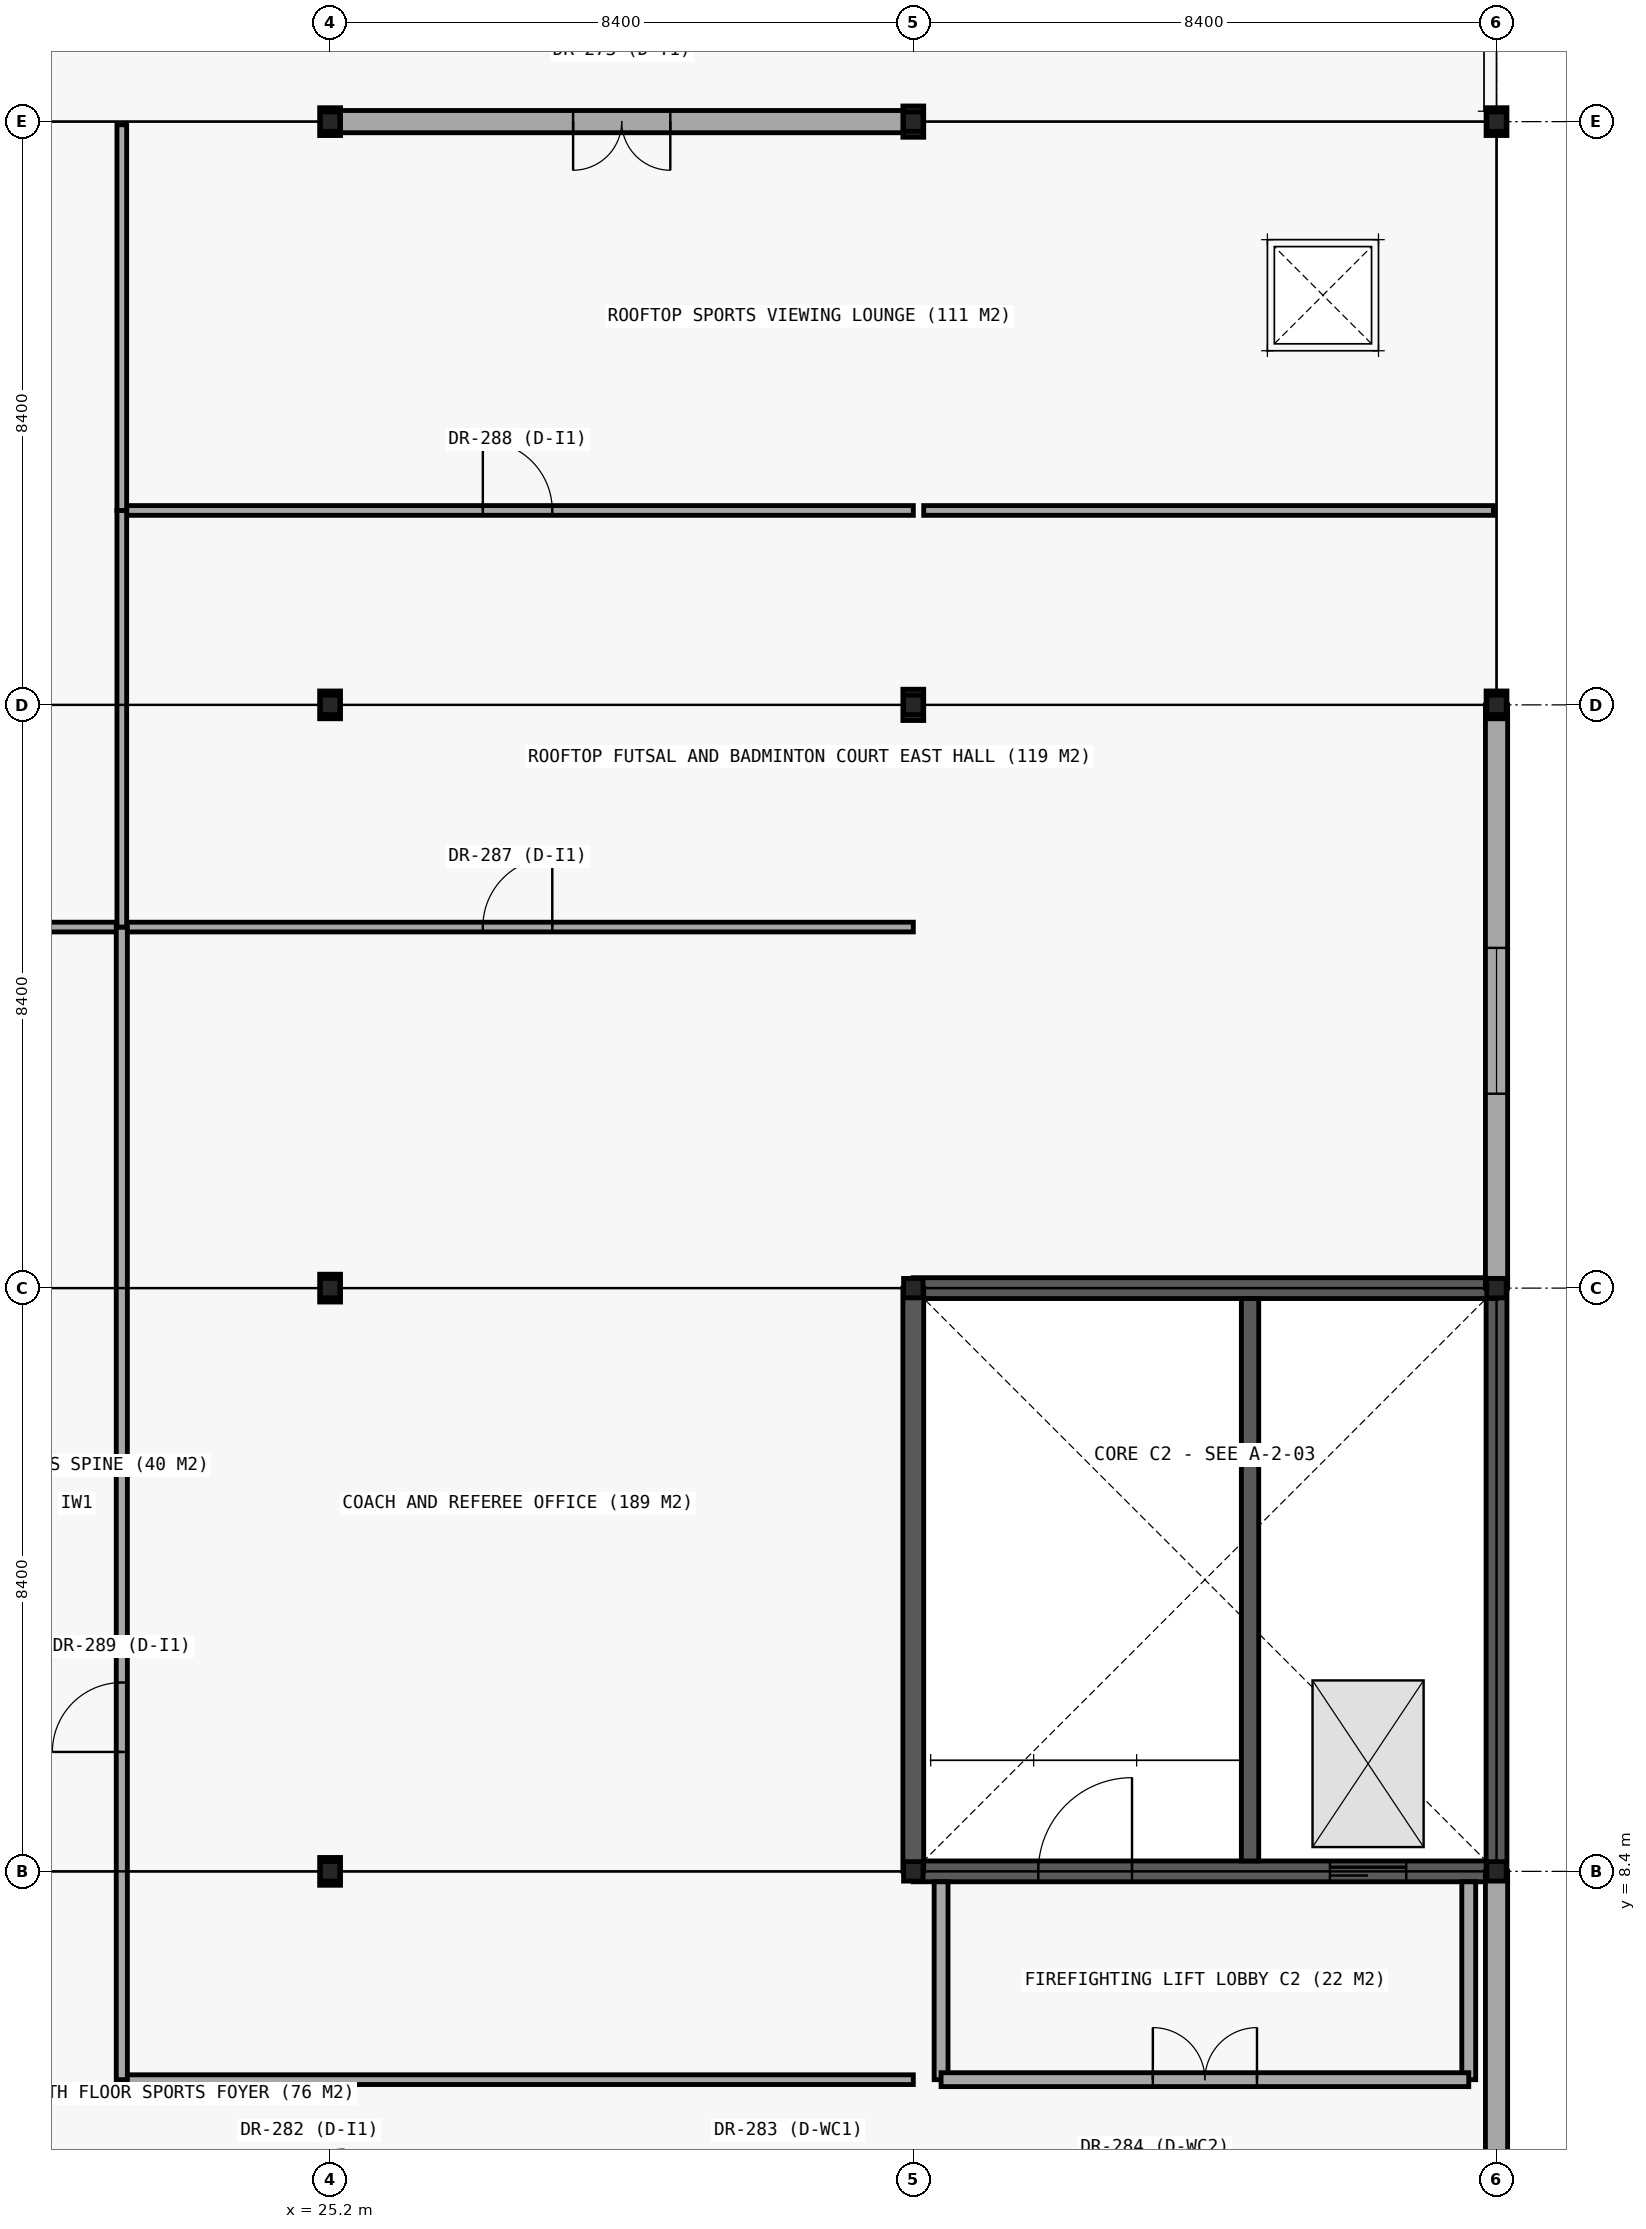
"""IFC4 building model, lengths in metres.
Left out: names, types, materials, properties, quantities, classifications, styles, units other than length and angle.
Written with IfcOpenShell. Run it as: python <this file> out.ifc"""

import sys

from ifc_helpers import new_model, si_unit, direction, frame, frame_2d, origin, origin_2d, place, context, subcontext, project, spatial, rectangle, i_section, extrude, element, fill, save


model = new_model("IFC4")
c1 = context("Model", 3, precision=1e-05, world=origin(), true_north=direction((0.0, 1.0)))
c2 = subcontext(c1, "Body", "Model", "MODEL_VIEW")
j1 = project(units=[si_unit("LENGTHUNIT", "METRE"), si_unit("PLANEANGLEUNIT", "RADIAN")], contexts=[c1])
p1 = place(None, origin())
s1 = spatial("IfcSite", under=j1, at=p1, CompositionType="ELEMENT")
p2 = place(p1, origin())
s2 = spatial("IfcBuilding", under=s1, at=p2, CompositionType="ELEMENT")
p3 = place(p2, frame((0.0, 0.0, 26.4)))
s3 = spatial("IfcBuildingStorey", under=s2, at=p3, CompositionType="ELEMENT", Elevation=26.4)
p4 = place(p3, frame((33.6, 8.4, 0.0), z_axis=(0.0, 0.0, 1.0), x_axis=(1.0, 0.0, 0.0)))
e1 = element("IfcWall", 1, at=p4, inside=s3, PredefinedType="SHEAR", context=c2, shape_type="SweptSolid", body=[
    extrude(rectangle(XDim=8.4, YDim=0.3, at=frame_2d((4.2, 0.0))), origin(), (0.0, 0.0, 1.0), 4.8),
])
p5 = place(p4, frame((1.8, 0.0, 0.0)))
e2 = element("IfcOpeningElement", 2, at=p5, cuts=e1, PredefinedType="OPENING", context=c2, shape_type="SweptSolid", body=[
    extrude(rectangle(XDim=1.35, YDim=2.2, at=frame_2d((0.675, 1.1))), frame((0.0, 0.16, 0.0), z_axis=(0.0, -1.0, 0.0), x_axis=(1.0, 0.0, 0.0)), (0.0, 0.0, 1.0), 0.32),
])
p6 = place(p4, frame((6.0, 0.0, 0.0)))
e3 = element("IfcOpeningElement", 3, at=p6, cuts=e1, PredefinedType="OPENING", context=c2, shape_type="SweptSolid", body=[
    extrude(rectangle(XDim=1.1, YDim=2.2, at=frame_2d((0.55, 1.1))), frame((0.0, 0.16, 0.0), z_axis=(0.0, -1.0, 0.0), x_axis=(1.0, 0.0, 0.0)), (0.0, 0.0, 1.0), 0.32),
])
p7 = place(p3, frame((42.0, 8.4, 0.0), z_axis=(0.0, 0.0, 1.0), x_axis=(0.0, 1.0, 0.0)))
e4 = element("IfcWall", 4, at=p7, inside=s3, PredefinedType="SHEAR", context=c2, shape_type="SweptSolid", body=[
    extrude(rectangle(XDim=8.4, YDim=0.3, at=frame_2d((4.2, 0.0))), origin(), (0.0, 0.0, 1.0), 4.8),
])
p8 = place(p3, frame((42.0, 16.8, 0.0), z_axis=(0.0, 0.0, 1.0), x_axis=(-1.0, 0.0, 0.0)))
e5 = element("IfcWall", 5, at=p8, inside=s3, PredefinedType="SHEAR", context=c2, shape_type="SweptSolid", body=[
    extrude(rectangle(XDim=8.4, YDim=0.3, at=frame_2d((4.2, 0.0))), origin(), (0.0, 0.0, 1.0), 4.8),
])
p9 = place(p3, frame((33.6, 16.8, 0.0), z_axis=(0.0, 0.0, 1.0), x_axis=(0.0, -1.0, 0.0)))
e6 = element("IfcWall", 6, at=p9, inside=s3, PredefinedType="SHEAR", context=c2, shape_type="SweptSolid", body=[
    extrude(rectangle(XDim=8.4, YDim=0.3, at=frame_2d((4.2, 0.0))), origin(), (0.0, 0.0, 1.0), 4.8),
])
p10 = place(p3, frame((38.45, 8.55, 0.0), z_axis=(0.0, 0.0, 1.0), x_axis=(0.0, 1.0, 0.0)))
e7 = element("IfcWall", 7, at=p10, inside=s3, PredefinedType="SHEAR", context=c2, shape_type="SweptSolid", body=[
    extrude(rectangle(XDim=8.1, YDim=0.25, at=frame_2d((4.05, 0.0))), origin(), (0.0, 0.0, 1.0), 4.8),
])
for number, where, z_axis, x_axis in (
    (8, (25.2, 8.4, 0.0), (0.0, 0.0, 1.0), (1.0, 0.0, 0.0)),
    (9, (25.2, 16.8, 0.0), (0.0, 0.0, 1.0), (1.0, 0.0, 0.0)),
    (10, (25.2, 25.2, 0.0), (0.0, 0.0, 1.0), (1.0, 0.0, 0.0)),
    (11, (25.2, 33.6, 0.0), (0.0, 0.0, 1.0), (1.0, 0.0, 0.0)),
):
    element("IfcColumn", number, at=place(p3, frame(where, z_axis=z_axis, x_axis=x_axis)), inside=s3, PredefinedType="COLUMN", context=c2, shape_type="SweptSolid", body=[
        extrude(i_section(OverallWidth=0.3, OverallDepth=0.4, WebThickness=0.013, FlangeThickness=0.024, FilletRadius=0.027, at=origin_2d()), origin(), (0.0, 0.0, 1.0), 4.63),
    ])
for number, where, z_axis, x_axis in (
    (12, (33.6, 25.2, 0.0), (0.0, 0.0, 1.0), (1.0, 0.0, 0.0)),
    (13, (33.6, 33.6, 0.0), (0.0, 0.0, 1.0), (1.0, 0.0, 0.0)),
):
    element("IfcColumn", number, at=place(p3, frame(where, z_axis=z_axis, x_axis=x_axis)), inside=s3, PredefinedType="COLUMN", context=c2, shape_type="SweptSolid", body=[
        extrude(i_section(OverallWidth=0.3, OverallDepth=0.45, WebThickness=0.014, FlangeThickness=0.026, FilletRadius=0.027, at=origin_2d()), origin(), (0.0, 0.0, 1.0), 4.63),
    ])
for number, where, z_axis, x_axis in (
    (14, (42.0, 25.2, 0.0), (0.0, 0.0, 1.0), (1.0, 0.0, 0.0)),
    (15, (42.0, 33.6, 0.0), (0.0, 0.0, 1.0), (1.0, 0.0, 0.0)),
):
    element("IfcColumn", number, at=place(p3, frame(where, z_axis=z_axis, x_axis=x_axis)), inside=s3, PredefinedType="COLUMN", context=c2, shape_type="SweptSolid", body=[
        extrude(i_section(OverallWidth=0.3, OverallDepth=0.4, WebThickness=0.013, FlangeThickness=0.024, FilletRadius=0.027, at=origin_2d()), origin(), (0.0, 0.0, 1.0), 4.63),
    ])
for number, where, z_axis, x_axis in (
    (16, (25.2, 8.4, 4.63), (0.0, 0.0, 1.0), (1.0, 0.0, 0.0)),
    (17, (33.6, 8.4, 4.63), (0.0, 0.0, 1.0), (1.0, 0.0, 0.0)),
    (18, (42.0, 8.4, 4.63), (0.0, 0.0, 1.0), (1.0, 0.0, 0.0)),
    (19, (25.2, 16.8, 4.63), (0.0, 0.0, 1.0), (1.0, 0.0, 0.0)),
    (20, (33.6, 16.8, 4.63), (0.0, 0.0, 1.0), (1.0, 0.0, 0.0)),
    (21, (42.0, 16.8, 4.63), (0.0, 0.0, 1.0), (1.0, 0.0, 0.0)),
    (22, (25.2, 25.2, 4.63), (0.0, 0.0, 1.0), (1.0, 0.0, 0.0)),
    (23, (33.6, 25.2, 4.63), (0.0, 0.0, 1.0), (1.0, 0.0, 0.0)),
    (24, (42.0, 25.2, 4.63), (0.0, 0.0, 1.0), (1.0, 0.0, 0.0)),
    (25, (25.2, 33.6, 4.63), (0.0, 0.0, 1.0), (1.0, 0.0, 0.0)),
    (26, (33.6, 33.6, 4.63), (0.0, 0.0, 1.0), (1.0, 0.0, 0.0)),
    (27, (42.0, 33.6, 4.63), (0.0, 0.0, 1.0), (1.0, 0.0, 0.0)),
):
    element("IfcColumn", number, at=place(p3, frame(where, z_axis=z_axis, x_axis=x_axis)), inside=s3, PredefinedType="COLUMN", context=c2, shape_type="SweptSolid", body=[
        extrude(i_section(OverallWidth=0.28, OverallDepth=0.28, WebThickness=0.01, FlangeThickness=0.018, FilletRadius=0.024, at=origin_2d()), origin(), (0.0, 0.0, 1.0), 2.4),
    ])
p11 = place(p3, frame((33.6, 33.6, 0.0), z_axis=(0.0, 0.0, 1.0), x_axis=(-1.0, 0.0, 0.0)))
e28 = element("IfcWall", 28, at=p11, inside=s3, PredefinedType="STANDARD", context=c2, shape_type="SweptSolid", body=[
    extrude(rectangle(XDim=8.4, YDim=0.32, at=frame_2d((4.2, 0.0))), origin(), (0.0, 0.0, 1.0), 4.06),
])
p12 = place(p11, frame((3.5, 0.0, 0.0)))
e29 = element("IfcOpeningElement", 29, at=p12, cuts=e28, PredefinedType="OPENING", context=c2, shape_type="SweptSolid", body=[
    extrude(rectangle(XDim=1.4, YDim=2.3, at=frame_2d((0.7, 1.15))), frame((0.0, 0.17, 0.0), z_axis=(0.0, -1.0, 0.0), x_axis=(1.0, 0.0, 0.0)), (0.0, 0.0, 1.0), 0.34),
])
p13 = place(p3, frame((42.0, 0.0, 0.0), z_axis=(0.0, 0.0, 1.0), x_axis=(0.0, 1.0, 0.0)))
e30 = element("IfcWall", 30, at=p13, inside=s3, PredefinedType="STANDARD", context=c2, shape_type="SweptSolid", body=[
    extrude(rectangle(XDim=8.4, YDim=0.32, at=frame_2d((4.2, 0.0))), origin(), (0.0, 0.0, 1.0), 4.06),
])
p14 = place(p13, frame((1.012, 0.0, 0.9)))
e31 = element("IfcOpeningElement", 31, at=p14, cuts=e30, PredefinedType="OPENING", context=c2, shape_type="SweptSolid", body=[
    extrude(rectangle(XDim=2.1, YDim=2.1, at=frame_2d((1.05, 1.05))), frame((0.0, 0.17, 0.0), z_axis=(0.0, -1.0, 0.0), x_axis=(1.0, 0.0, 0.0)), (0.0, 0.0, 1.0), 0.34),
])
p15 = place(p3, frame((42.0, 16.8, 0.0), z_axis=(0.0, 0.0, 1.0), x_axis=(0.0, 1.0, 0.0)))
e32 = element("IfcWall", 32, at=p15, inside=s3, PredefinedType="STANDARD", context=c2, shape_type="SweptSolid", body=[
    extrude(rectangle(XDim=8.4, YDim=0.32, at=frame_2d((4.2, 0.0))), origin(), (0.0, 0.0, 1.0), 4.06),
])
p16 = place(p15, frame((2.8, 0.0, 0.9)))
e33 = element("IfcOpeningElement", 33, at=p16, cuts=e32, PredefinedType="OPENING", context=c2, shape_type="SweptSolid", body=[
    extrude(rectangle(XDim=2.1, YDim=2.1, at=frame_2d((1.05, 1.05))), frame((0.0, 0.17, 0.0), z_axis=(0.0, -1.0, 0.0), x_axis=(1.0, 0.0, 0.0)), (0.0, 0.0, 1.0), 0.34),
])
for number, where, z_axis, x_axis in (
    (34, (34.0, 5.4, 0.0), (0.0, 0.0, 1.0), (0.0, 1.0, 0.0)),
    (35, (41.6, 5.4, 0.0), (0.0, 0.0, 1.0), (0.0, 1.0, 0.0)),
):
    element("IfcWall", number, at=place(p3, frame(where, z_axis=z_axis, x_axis=x_axis)), inside=s3, PredefinedType="PARTITIONING", context=c2, shape_type="SweptSolid", body=[
        extrude(rectangle(XDim=2.85, YDim=0.2, at=frame_2d((1.425, 0.0))), origin(), (0.0, 0.0, 1.0), 4.06),
    ])
p17 = place(p3, frame((34.0, 5.4, 0.0), z_axis=(0.0, 0.0, 1.0), x_axis=(1.0, 0.0, 0.0)))
e36 = element("IfcWall", 36, at=p17, inside=s3, PredefinedType="PARTITIONING", context=c2, shape_type="SweptSolid", body=[
    extrude(rectangle(XDim=7.6, YDim=0.2, at=frame_2d((3.8, 0.0))), origin(), (0.0, 0.0, 1.0), 4.12),
])
p18 = place(p17, frame((3.05, 0.0, 0.0)))
e37 = element("IfcOpeningElement", 37, at=p18, cuts=e36, PredefinedType="OPENING", context=c2, shape_type="SweptSolid", body=[
    extrude(rectangle(XDim=1.5, YDim=2.2, at=frame_2d((0.75, 1.1))), frame((0.0, 0.11, 0.0), z_axis=(0.0, -1.0, 0.0), x_axis=(1.0, 0.0, 0.0)), (0.0, 0.0, 1.0), 0.22),
])
p19 = place(p3, frame((22.2, 5.4, 0.0), z_axis=(0.0, 0.0, 1.0), x_axis=(1.0, 0.0, 0.0)))
e38 = element("IfcWall", 38, at=p19, inside=s3, PredefinedType="PARTITIONING", context=c2, shape_type="SweptSolid", body=[
    extrude(rectangle(XDim=11.4, YDim=0.14, at=frame_2d((5.7, 0.0))), origin(), (0.0, 0.0, 1.0), 4.1),
])
p20 = place(p3, frame((19.8, 22.0, 0.0), z_axis=(0.0, 0.0, 1.0), x_axis=(1.0, 0.0, 0.0)))
e39 = element("IfcWall", 39, at=p20, inside=s3, PredefinedType="PARTITIONING", context=c2, shape_type="SweptSolid", body=[
    extrude(rectangle(XDim=2.4, YDim=0.14, at=frame_2d((1.2, 0.0))), origin(), (0.0, 0.0, 1.0), 4.1),
])
p21 = place(p3, frame((22.2, 22.0, 0.0), z_axis=(0.0, 0.0, 1.0), x_axis=(1.0, 0.0, 0.0)))
e40 = element("IfcWall", 40, at=p21, inside=s3, PredefinedType="PARTITIONING", context=c2, shape_type="SweptSolid", body=[
    extrude(rectangle(XDim=11.4, YDim=0.14, at=frame_2d((5.7, 0.0))), origin(), (0.0, 0.0, 1.0), 4.1),
])
p22 = place(p21, frame((5.2, 0.0, 0.0)))
e41 = element("IfcOpeningElement", 41, at=p22, cuts=e40, PredefinedType="OPENING", context=c2, shape_type="SweptSolid", body=[
    extrude(rectangle(XDim=1.0, YDim=2.15, at=frame_2d((0.5, 1.075))), frame((0.0, 0.08, 0.0), z_axis=(0.0, -1.0, 0.0), x_axis=(1.0, 0.0, 0.0)), (0.0, 0.0, 1.0), 0.16),
])
p23 = place(p3, frame((22.2, 28.0, 0.0), z_axis=(0.0, 0.0, 1.0), x_axis=(1.0, 0.0, 0.0)))
e42 = element("IfcWall", 42, at=p23, inside=s3, PredefinedType="PARTITIONING", context=c2, shape_type="SweptSolid", body=[
    extrude(rectangle(XDim=11.4, YDim=0.14, at=frame_2d((5.7, 0.0))), origin(), (0.0, 0.0, 1.0), 4.1),
])
p24 = place(p23, frame((5.2, 0.0, 0.0)))
e43 = element("IfcOpeningElement", 43, at=p24, cuts=e42, PredefinedType="OPENING", context=c2, shape_type="SweptSolid", body=[
    extrude(rectangle(XDim=1.0, YDim=2.15, at=frame_2d((0.5, 1.075))), frame((0.0, 0.08, 0.0), z_axis=(0.0, -1.0, 0.0), x_axis=(1.0, 0.0, 0.0)), (0.0, 0.0, 1.0), 0.16),
])
p25 = place(p3, frame((33.75, 28.0, 0.0), z_axis=(0.0, 0.0, 1.0), x_axis=(1.0, 0.0, 0.0)))
e44 = element("IfcWall", 44, at=p25, inside=s3, PredefinedType="PARTITIONING", context=c2, shape_type="SweptSolid", body=[
    extrude(rectangle(XDim=8.205, YDim=0.14, at=frame_2d((4.103, 0.0))), origin(), (0.0, 0.0, 1.0), 4.1),
])
p26 = place(p3, frame((22.2, 5.4, 0.0), z_axis=(0.0, 0.0, 1.0), x_axis=(0.0, 1.0, 0.0)))
e45 = element("IfcWall", 45, at=p26, inside=s3, PredefinedType="PARTITIONING", context=c2, shape_type="SweptSolid", body=[
    extrude(rectangle(XDim=16.6, YDim=0.16, at=frame_2d((8.3, 0.0))), origin(), (0.0, 0.0, 1.0), 4.1),
])
p27 = place(p26, frame((4.72, 0.0, 0.0)))
e46 = element("IfcOpeningElement", 46, at=p27, cuts=e45, PredefinedType="OPENING", context=c2, shape_type="SweptSolid", body=[
    extrude(rectangle(XDim=1.0, YDim=2.15, at=frame_2d((0.5, 1.075))), frame((0.0, 0.09, 0.0), z_axis=(0.0, -1.0, 0.0), x_axis=(1.0, 0.0, 0.0)), (0.0, 0.0, 1.0), 0.18),
])
p28 = place(p3, frame((22.2, 22.0, 0.0), z_axis=(0.0, 0.0, 1.0), x_axis=(0.0, 1.0, 0.0)))
e47 = element("IfcWall", 47, at=p28, inside=s3, PredefinedType="PARTITIONING", context=c2, shape_type="SweptSolid", body=[
    extrude(rectangle(XDim=6.0, YDim=0.14, at=frame_2d((3.0, 0.0))), origin(), (0.0, 0.0, 1.0), 4.1),
])
p29 = place(p3, frame((22.2, 28.0, 0.0), z_axis=(0.0, 0.0, 1.0), x_axis=(0.0, 1.0, 0.0)))
e48 = element("IfcWall", 48, at=p29, inside=s3, PredefinedType="PARTITIONING", context=c2, shape_type="SweptSolid", body=[
    extrude(rectangle(XDim=5.555, YDim=0.14, at=frame_2d((2.777, 0.0))), origin(), (0.0, 0.0, 1.0), 4.1),
])
p30 = place(p12, origin())
e49 = element("IfcDoor", 49, at=p30, inside=s3, OperationType="DOUBLE_DOOR_SINGLE_SWING", PredefinedType="DOOR", context=c2, shape_type="SweptSolid", body=[
    extrude(rectangle(XDim=1.4, YDim=2.3, at=frame_2d((0.7, 1.15))), frame((0.0, 0.025, 0.0), z_axis=(0.0, -1.0, 0.0), x_axis=(1.0, 0.0, 0.0)), (0.0, 0.0, 1.0), 0.05),
])
fill(e29, e49)
p31 = place(p16, origin())
e50 = element("IfcWindow", 50, at=p31, inside=s3, PartitioningType="SINGLE_PANEL", PredefinedType="WINDOW", context=c2, shape_type="SweptSolid", body=[
    extrude(rectangle(XDim=2.1, YDim=2.1, at=frame_2d((1.05, 1.05))), frame((0.0, 0.03, 0.0), z_axis=(0.0, -1.0, 0.0), x_axis=(1.0, 0.0, 0.0)), (0.0, 0.0, 1.0), 0.06),
])
fill(e33, e50)
p32 = place(p5, origin())
e51 = element("IfcDoor", 51, at=p32, inside=s3, OperationType="SINGLE_SWING_RIGHT", PredefinedType="DOOR", context=c2, shape_type="SweptSolid", body=[
    extrude(rectangle(XDim=1.35, YDim=2.2, at=frame_2d((0.675, 1.1))), frame((0.0, 0.025, 0.0), z_axis=(0.0, -1.0, 0.0), x_axis=(1.0, 0.0, 0.0)), (0.0, 0.0, 1.0), 0.05),
])
fill(e2, e51)
p33 = place(p6, origin())
e52 = element("IfcDoor", 52, at=p33, inside=s3, OperationType="SLIDING_TO_LEFT", PredefinedType="DOOR", context=c2, shape_type="SweptSolid", body=[
    extrude(rectangle(XDim=1.1, YDim=2.2, at=frame_2d((0.55, 1.1))), frame((0.0, 0.025, 0.0), z_axis=(0.0, -1.0, 0.0), x_axis=(1.0, 0.0, 0.0)), (0.0, 0.0, 1.0), 0.05),
])
fill(e3, e52)
p34 = place(p18, origin())
e53 = element("IfcDoor", 53, at=p34, inside=s3, OperationType="DOUBLE_DOOR_SINGLE_SWING", PredefinedType="DOOR", context=c2, shape_type="SweptSolid", body=[
    extrude(rectangle(XDim=1.5, YDim=2.2, at=frame_2d((0.75, 1.1))), frame((0.0, 0.025, 0.0), z_axis=(0.0, -1.0, 0.0), x_axis=(1.0, 0.0, 0.0)), (0.0, 0.0, 1.0), 0.05),
])
fill(e37, e53)
p35 = place(p22, origin())
e54 = element("IfcDoor", 54, at=p35, inside=s3, OperationType="SINGLE_SWING_RIGHT", PredefinedType="DOOR", context=c2, shape_type="SweptSolid", body=[
    extrude(rectangle(XDim=1.0, YDim=2.15, at=frame_2d((0.5, 1.075))), frame((0.0, 0.025, 0.0), z_axis=(0.0, -1.0, 0.0), x_axis=(1.0, 0.0, 0.0)), (0.0, 0.0, 1.0), 0.05),
])
fill(e41, e54)
p36 = place(p24, origin())
e55 = element("IfcDoor", 55, at=p36, inside=s3, OperationType="SINGLE_SWING_LEFT", PredefinedType="DOOR", context=c2, shape_type="SweptSolid", body=[
    extrude(rectangle(XDim=1.0, YDim=2.15, at=frame_2d((0.5, 1.075))), frame((0.0, 0.025, 0.0), z_axis=(0.0, -1.0, 0.0), x_axis=(1.0, 0.0, 0.0)), (0.0, 0.0, 1.0), 0.05),
])
fill(e43, e55)
p37 = place(p27, origin())
e56 = element("IfcDoor", 56, at=p37, inside=s3, OperationType="SINGLE_SWING_LEFT", PredefinedType="DOOR", context=c2, shape_type="SweptSolid", body=[
    extrude(rectangle(XDim=1.0, YDim=2.15, at=frame_2d((0.5, 1.075))), frame((0.0, 0.025, 0.0), z_axis=(0.0, -1.0, 0.0), x_axis=(1.0, 0.0, 0.0)), (0.0, 0.0, 1.0), 0.05),
])
fill(e46, e56)
save(model, sys.argv[1])
